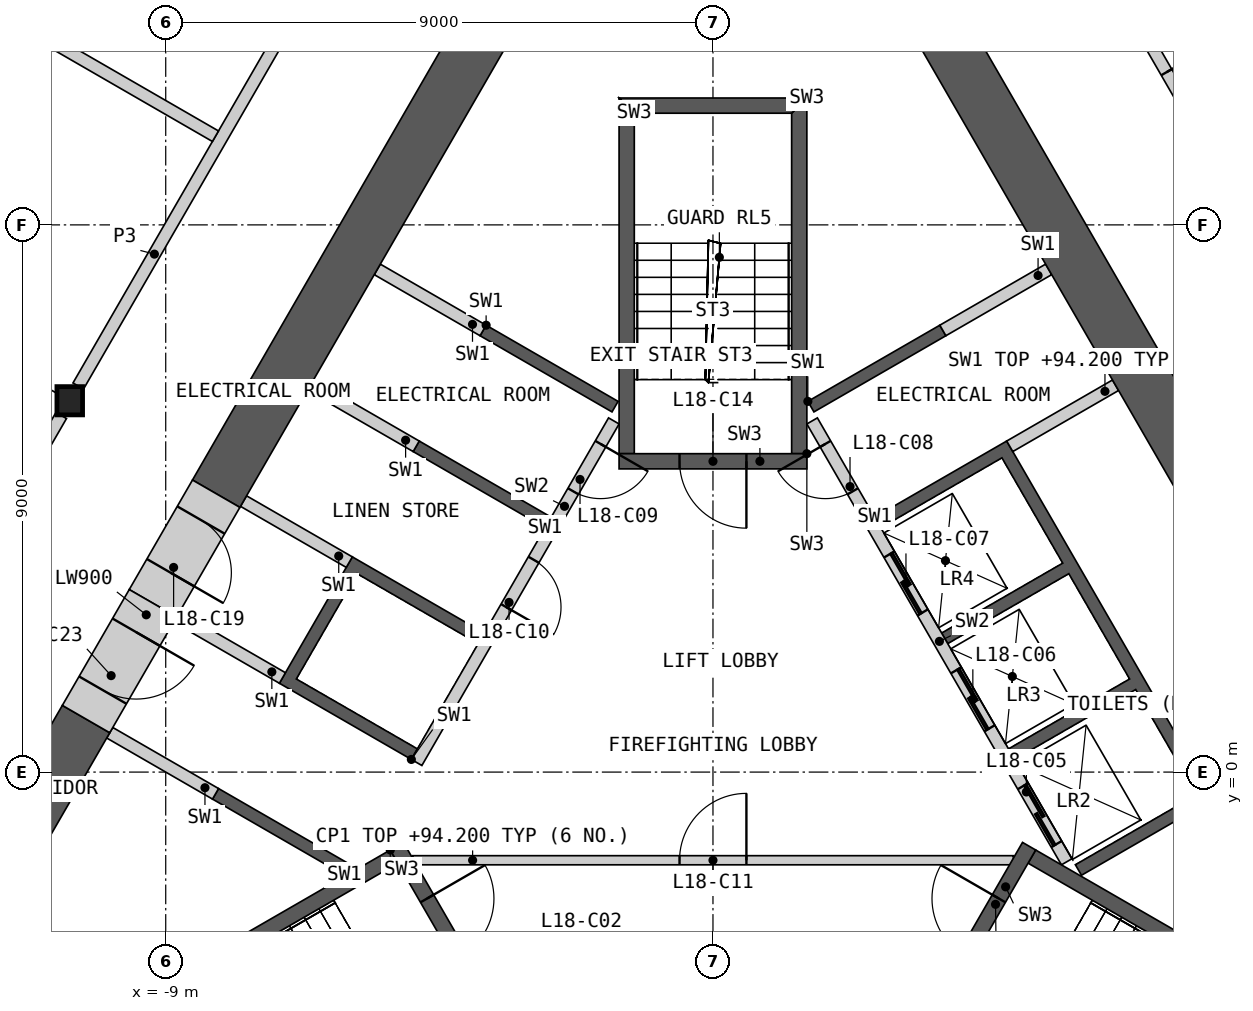
"""IFC4 building model, lengths in metres.
Left out: names, types, materials, properties, quantities, classifications, styles, units other than length and angle.
Written with IfcOpenShell. Run it as: python <this file> out.ifc"""

import sys

from ifc_helpers import new_model, si_unit, direction, frame, frame_2d, origin, origin_2d, place, context, subcontext, project, spatial, polyline, rectangle, i_section, outline, extrude, element, fill, save


model = new_model("IFC4")
c1 = context("Model", 3, precision=1e-05, world=origin(), true_north=direction((0.0, 1.0)))
c2 = subcontext(c1, "Body", "Model", "MODEL_VIEW")
j1 = project(units=[si_unit("LENGTHUNIT", "METRE"), si_unit("PLANEANGLEUNIT", "RADIAN")], contexts=[c1])
p1 = place(None, origin())
s1 = spatial("IfcSite", under=j1, at=p1, CompositionType="ELEMENT")
p2 = place(p1, origin())
s2 = spatial("IfcBuilding", under=s1, at=p2, CompositionType="ELEMENT")
p3 = place(p2, frame((0.0, 0.0, 84.6)))
s3 = spatial("IfcBuildingStorey", under=s2, at=p3, CompositionType="ELEMENT", Elevation=84.6)
p4 = place(p3, frame((-10.578, 6.107, 0.0), z_axis=(0.0, 0.0, 1.0), x_axis=(1.0, 0.0, 0.0)))
e1 = element("IfcColumn", 1, at=p4, inside=s3, PredefinedType="COLUMN", context=c2, shape_type="SweptSolid", body=[
    extrude(i_section(OverallWidth=0.421, OverallDepth=0.465, WebThickness=0.045, FlangeThickness=0.072, at=origin_2d()), origin(), (0.0, 0.0, 1.0), 10.0),
])
p5 = place(p3, origin())
e2 = element("IfcWall", 2, at=p5, inside=s3, PredefinedType="SHEAR", context=c2, shape_type="SweptSolid", body=[
    extrude(outline(polyline([(1.561, 6.097), (3.731, 7.35), (3.831, 7.177), (1.66, 5.924), (1.561, 6.097)])), origin(), (0.0, 0.0, 1.0), 9.6),
])
p6 = place(p3, origin())
e3 = element("IfcWall", 3, at=p6, inside=s3, PredefinedType="SHEAR", context=c2, shape_type="SweptSolid", body=[
    extrude(outline(polyline([(2.66, 4.192), (4.831, 5.445), (8.231, -0.444), (6.061, -1.697), (5.96, -1.524), (7.952, -0.374), (6.952, 1.358), (4.96, 0.208), (4.861, 0.381), (6.852, 1.531), (5.852, 3.263), (3.861, 2.113), (3.76, 2.287), (5.752, 3.437), (4.752, 5.169), (2.76, 4.019), (2.66, 4.192)])), origin(), (0.0, 0.0, 1.0), 9.6),
])
p7 = place(p3, frame((5.817, -1.476, 0.0), z_axis=(0.0, 0.0, 1.0), x_axis=(-0.500002616675, 0.866023893041, 0.0)))
e4 = element("IfcWall", 4, at=p7, inside=s3, PredefinedType="SOLIDWALL", context=c2, shape_type="SweptSolid", body=[
    extrude(rectangle(XDim=8.373, YDim=0.2, at=frame_2d((4.187, 0.0))), origin(), (0.0, 0.0, 1.0), 9.6),
])
p8 = place(p7, frame((0.337, 0.0, 0.0)))
e5 = element("IfcOpeningElement", 5, at=p8, cuts=e4, PredefinedType="OPENING", context=c2, shape_type="SweptSolid", body=[
    extrude(rectangle(XDim=1.1, YDim=2.1, at=frame_2d((0.55, 1.05))), frame((0.0, 0.11, 0.0), z_axis=(0.0, -1.0, 0.0), x_axis=(1.0, 0.0, 0.0)), (0.0, 0.0, 1.0), 0.22),
])
p9 = place(p7, frame((2.537, 0.0, 0.0)))
e6 = element("IfcOpeningElement", 6, at=p9, cuts=e4, PredefinedType="OPENING", context=c2, shape_type="SweptSolid", body=[
    extrude(rectangle(XDim=1.1, YDim=2.1, at=frame_2d((0.55, 1.05))), frame((0.0, 0.11, 0.0), z_axis=(0.0, -1.0, 0.0), x_axis=(1.0, 0.0, 0.0)), (0.0, 0.0, 1.0), 0.22),
])
p10 = place(p7, frame((4.737, 0.0, 0.0)))
e7 = element("IfcOpeningElement", 7, at=p10, cuts=e4, PredefinedType="OPENING", context=c2, shape_type="SweptSolid", body=[
    extrude(rectangle(XDim=1.1, YDim=2.1, at=frame_2d((0.55, 1.05))), frame((0.0, 0.11, 0.0), z_axis=(0.0, -1.0, 0.0), x_axis=(1.0, 0.0, 0.0)), (0.0, 0.0, 1.0), 0.22),
])
p11 = place(p7, frame((7.037, 0.0, 0.0)))
e8 = element("IfcOpeningElement", 8, at=p11, cuts=e4, PredefinedType="OPENING", context=c2, shape_type="SweptSolid", body=[
    extrude(rectangle(XDim=0.9, YDim=2.1, at=frame_2d((0.45, 1.05))), frame((0.0, 0.11, 0.0), z_axis=(0.0, -1.0, 0.0), x_axis=(1.0, 0.0, 0.0)), (0.0, 0.0, 1.0), 0.22),
])
p12 = place(p3, frame((4.881, 5.358, 0.0), z_axis=(0.0, 0.0, 1.0), x_axis=(0.866035824272, 0.499981950752, 0.0)))
e9 = element("IfcWall", 9, at=p12, inside=s3, PredefinedType="SHEAR", context=c2, shape_type="SweptSolid", body=[
    extrude(rectangle(XDim=2.009, YDim=0.2, at=frame_2d((1.004, 0.0))), origin(), (0.0, 0.0, 1.0), 9.6),
])
p13 = place(p3, frame((3.781, 7.263, 0.0), z_axis=(0.0, 0.0, 1.0), x_axis=(0.865983199114, 0.50007309351, 0.0)))
e10 = element("IfcWall", 10, at=p13, inside=s3, PredefinedType="SHEAR", context=c2, shape_type="SweptSolid", body=[
    extrude(rectangle(XDim=2.009, YDim=0.2, at=frame_2d((1.004, 0.0))), origin(), (0.0, 0.0, 1.0), 9.6),
])
p14 = place(p3, origin())
e11 = element("IfcWall", 11, at=p14, inside=s3, PredefinedType="SHEAR", context=c2, shape_type="SweptSolid", body=[
    extrude(outline(polyline([(-6.061, -1.697), (-8.231, -0.444), (-8.131, -0.271), (-5.96, -1.524), (-6.061, -1.697)])), origin(), (0.0, 0.0, 1.0), 9.6),
])
p15 = place(p3, origin())
e12 = element("IfcWall", 12, at=p15, inside=s3, PredefinedType="SHEAR", context=c2, shape_type="SweptSolid", body=[
    extrude(outline(polyline([(-4.96, 0.208), (-7.131, 1.461), (-5.931, 3.54), (-3.76, 2.287), (-3.861, 2.113), (-5.852, 3.263), (-6.852, 1.531), (-4.861, 0.381), (-4.96, 0.208)])), origin(), (0.0, 0.0, 1.0), 9.6),
])
p16 = place(p3, origin())
e13 = element("IfcWall", 13, at=p16, inside=s3, PredefinedType="SHEAR", context=c2, shape_type="SweptSolid", body=[
    extrude(outline(polyline([(-2.76, 4.019), (-4.931, 5.272), (-4.831, 5.445), (-2.66, 4.192), (-2.76, 4.019)])), origin(), (0.0, 0.0, 1.0), 9.6),
])
p17 = place(p3, origin())
e14 = element("IfcWall", 14, at=p17, inside=s3, PredefinedType="SHEAR", context=c2, shape_type="SweptSolid", body=[
    extrude(outline(polyline([(-3.731, 7.35), (-1.561, 6.097), (-1.66, 5.924), (-3.831, 7.177), (-3.731, 7.35)])), origin(), (0.0, 0.0, 1.0), 9.6),
])
p18 = place(p3, frame((-1.631, 5.776, 0.0), z_axis=(0.0, 0.0, 1.0), x_axis=(-0.499992876559, -0.866029516466, 0.0)))
e15 = element("IfcWall", 15, at=p18, inside=s3, PredefinedType="SOLIDWALL", context=c2, shape_type="SweptSolid", body=[
    extrude(rectangle(XDim=6.486, YDim=0.2, at=frame_2d((3.243, 0.0))), origin(), (0.0, 0.0, 1.0), 9.6),
])
p19 = place(p18, frame((0.437, 0.0, 0.0)))
e16 = element("IfcOpeningElement", 16, at=p19, cuts=e15, PredefinedType="OPENING", context=c2, shape_type="SweptSolid", body=[
    extrude(rectangle(XDim=0.9, YDim=2.1, at=frame_2d((0.45, 1.05))), frame((0.0, 0.11, 0.0), z_axis=(0.0, -1.0, 0.0), x_axis=(1.0, 0.0, 0.0)), (0.0, 0.0, 1.0), 0.22),
])
p20 = place(p18, frame((2.637, 0.0, 0.0)))
e17 = element("IfcOpeningElement", 17, at=p20, cuts=e15, PredefinedType="OPENING", context=c2, shape_type="SweptSolid", body=[
    extrude(rectangle(XDim=0.9, YDim=2.1, at=frame_2d((0.45, 1.05))), frame((0.0, 0.11, 0.0), z_axis=(0.0, -1.0, 0.0), x_axis=(1.0, 0.0, 0.0)), (0.0, 0.0, 1.0), 0.22),
])
p21 = place(p3, frame((-3.781, 7.263, 0.0), z_axis=(0.0, 0.0, 1.0), x_axis=(-0.865983199114, 0.50007309351, 0.0)))
e18 = element("IfcWall", 18, at=p21, inside=s3, PredefinedType="SHEAR", context=c2, shape_type="SweptSolid", body=[
    extrude(rectangle(XDim=2.009, YDim=0.2, at=frame_2d((1.004, 0.0))), origin(), (0.0, 0.0, 1.0), 9.6),
])
p22 = place(p3, frame((-4.881, 5.358, 0.0), z_axis=(0.0, 0.0, 1.0), x_axis=(-0.866035824272, 0.499981950752, 0.0)))
e19 = element("IfcWall", 19, at=p22, inside=s3, PredefinedType="SHEAR", context=c2, shape_type="SweptSolid", body=[
    extrude(rectangle(XDim=2.009, YDim=0.2, at=frame_2d((1.004, 0.0))), origin(), (0.0, 0.0, 1.0), 9.6),
])
p23 = place(p3, frame((-5.981, 3.453, 0.0), z_axis=(0.0, 0.0, 1.0), x_axis=(-0.866013584312, 0.500020471368, 0.0)))
e20 = element("IfcWall", 20, at=p23, inside=s3, PredefinedType="SHEAR", context=c2, shape_type="SweptSolid", body=[
    extrude(rectangle(XDim=2.009, YDim=0.2, at=frame_2d((1.005, 0.0))), origin(), (0.0, 0.0, 1.0), 9.6),
])
p24 = place(p3, frame((-7.081, 1.548, 0.0), z_axis=(0.0, 0.0, 1.0), x_axis=(-0.865983199114, 0.50007309351, 0.0)))
e21 = element("IfcWall", 21, at=p24, inside=s3, PredefinedType="SHEAR", context=c2, shape_type="SweptSolid", body=[
    extrude(rectangle(XDim=2.009, YDim=0.2, at=frame_2d((1.004, 0.0))), origin(), (0.0, 0.0, 1.0), 9.6),
])
p25 = place(p3, frame((-8.181, -0.357, 0.0), z_axis=(0.0, 0.0, 1.0), x_axis=(-0.866035824272, 0.499981950752, 0.0)))
e22 = element("IfcWall", 22, at=p25, inside=s3, PredefinedType="SHEAR", context=c2, shape_type="SweptSolid", body=[
    extrude(rectangle(XDim=2.009, YDim=0.2, at=frame_2d((1.004, 0.0))), origin(), (0.0, 0.0, 1.0), 9.6),
])
p26 = place(p3, frame((-4.941, -1.45, 0.0), z_axis=(0.0, 0.0, 1.0), x_axis=(1.0, 0.0, 0.0)))
e23 = element("IfcWall", 23, at=p26, inside=s3, PredefinedType="PARTITIONING", context=c2, shape_type="SweptSolid", body=[
    extrude(rectangle(XDim=9.882, YDim=0.15, at=frame_2d((4.941, 0.0))), origin(), (0.0, 0.0, 1.0), 9.6),
])
p27 = place(p26, frame((4.391, 0.0, 0.0)))
e24 = element("IfcOpeningElement", 24, at=p27, cuts=e23, PredefinedType="OPENING", context=c2, shape_type="SweptSolid", body=[
    extrude(rectangle(XDim=1.1, YDim=2.1, at=frame_2d((0.55, 1.05))), frame((0.0, 0.085, 0.0), z_axis=(0.0, -1.0, 0.0), x_axis=(1.0, 0.0, 0.0)), (0.0, 0.0, 1.0), 0.17),
])
p28 = place(p3, origin())
e25 = element("IfcWall", 25, at=p28, inside=s3, PredefinedType="SHEAR", context=c2, shape_type="SweptSolid", body=[
    extrude(outline(polyline([(-5.307, -1.281), (-10.374, -4.206), (-10.032, -4.298), (-5.182, -1.498), (-5.307, -1.281)])), origin(), (0.0, 0.0, 1.0), 9.6),
])
p29 = place(p3, frame((-5.199, -1.219, 0.0), z_axis=(0.0, 0.0, 1.0), x_axis=(0.499982516597, -0.866035497597, 0.0)))
e26 = element("IfcWall", 26, at=p29, inside=s3, PredefinedType="SHEAR", context=c2, shape_type="SweptSolid", body=[
    extrude(rectangle(XDim=3.088, YDim=0.25, at=frame_2d((1.544, 0.0))), origin(), (0.0, 0.0, 1.0), 9.6),
])
p30 = place(p29, frame((0.994, 0.0, 0.0)))
e27 = element("IfcOpeningElement", 27, at=p30, cuts=e26, PredefinedType="OPENING", context=c2, shape_type="SweptSolid", body=[
    extrude(rectangle(XDim=1.1, YDim=2.1, at=frame_2d((0.55, 1.05))), frame((0.0, 0.135, 0.0), z_axis=(0.0, -1.0, 0.0), x_axis=(1.0, 0.0, 0.0)), (0.0, 0.0, 1.0), 0.27),
])
p31 = place(p3, origin())
e28 = element("IfcWall", 28, at=p31, inside=s3, PredefinedType="SHEAR", context=c2, shape_type="SweptSolid", body=[
    extrude(outline(polyline([(10.032, -4.298), (10.374, -4.206), (5.307, -1.281), (5.182, -1.498), (10.032, -4.298)])), origin(), (0.0, 0.0, 1.0), 9.6),
])
p32 = place(p3, frame((3.655, -3.893, 0.0), z_axis=(0.0, 0.0, 1.0), x_axis=(0.499982516597, 0.866035497597, 0.0)))
e29 = element("IfcWall", 29, at=p32, inside=s3, PredefinedType="SHEAR", context=c2, shape_type="SweptSolid", body=[
    extrude(rectangle(XDim=3.088, YDim=0.25, at=frame_2d((1.544, 0.0))), origin(), (0.0, 0.0, 1.0), 9.6),
])
p33 = place(p32, frame((0.994, 0.0, 0.0)))
e30 = element("IfcOpeningElement", 30, at=p33, cuts=e29, PredefinedType="OPENING", context=c2, shape_type="SweptSolid", body=[
    extrude(rectangle(XDim=1.1, YDim=2.1, at=frame_2d((0.55, 1.05))), frame((0.0, 0.135, 0.0), z_axis=(0.0, -1.0, 0.0), x_axis=(1.0, 0.0, 0.0)), (0.0, 0.0, 1.0), 0.27),
])
p34 = place(p3, origin())
e31 = element("IfcWall", 31, at=p34, inside=s3, PredefinedType="SHEAR", context=c2, shape_type="SweptSolid", body=[
    extrude(outline(polyline([(1.544, 5.237), (1.544, 11.087), (1.294, 10.837), (1.294, 5.237), (1.544, 5.237)])), origin(), (0.0, 0.0, 1.0), 9.6),
])
p35 = place(p3, origin())
e32 = element("IfcWall", 32, at=p35, inside=s3, PredefinedType="SHEAR", context=c2, shape_type="SweptSolid", body=[
    extrude(outline(polyline([(1.544, 11.087), (-1.544, 11.087), (-1.294, 10.837), (1.294, 10.837), (1.544, 11.087)])), origin(), (0.0, 0.0, 1.0), 9.6),
])
p36 = place(p3, origin())
e33 = element("IfcWall", 33, at=p36, inside=s3, PredefinedType="SHEAR", context=c2, shape_type="SweptSolid", body=[
    extrude(outline(polyline([(-1.294, 10.837), (-1.544, 11.087), (-1.544, 5.237), (-1.294, 5.237), (-1.294, 10.837)])), origin(), (0.0, 0.0, 1.0), 9.6),
])
p37 = place(p3, frame((1.544, 5.112, 0.0), z_axis=(0.0, 0.0, 1.0), x_axis=(-1.0, 0.0, 0.0)))
e34 = element("IfcWall", 34, at=p37, inside=s3, PredefinedType="SHEAR", context=c2, shape_type="SweptSolid", body=[
    extrude(rectangle(XDim=3.088, YDim=0.25, at=frame_2d((1.544, 0.0))), origin(), (0.0, 0.0, 1.0), 9.6),
])
p38 = place(p37, frame((0.994, 0.0, 0.0)))
e35 = element("IfcOpeningElement", 35, at=p38, cuts=e34, PredefinedType="OPENING", context=c2, shape_type="SweptSolid", body=[
    extrude(rectangle(XDim=1.1, YDim=2.1, at=frame_2d((0.55, 1.05))), frame((0.0, 0.135, 0.0), z_axis=(0.0, -1.0, 0.0), x_axis=(1.0, 0.0, 0.0)), (0.0, 0.0, 1.0), 0.27),
])
p39 = place(p3, frame((8.16, 4.596, 0.0), z_axis=(0.0, 0.0, 1.0), x_axis=(-0.500009830349, 0.866019728156, 0.0)))
e36 = element("IfcWall", 36, at=p39, inside=s3, PredefinedType="SHEAR", context=c2, shape_type="SweptSolid", body=[
    extrude(rectangle(XDim=15.541, YDim=0.9, at=frame_2d((7.771, 0.0))), origin(), (0.0, 0.0, 1.0), 9.6),
])
p40 = place(p3, frame((-3.675, 12.365, 0.0), z_axis=(0.0, 0.0, 1.0), x_axis=(-0.500014716158, -0.86601690724, 0.0)))
e37 = element("IfcWall", 37, at=p40, inside=s3, PredefinedType="SHEAR", context=c2, shape_type="SweptSolid", body=[
    extrude(rectangle(XDim=8.99, YDim=0.9, at=frame_2d((4.495, 0.0))), origin(), (0.0, 0.0, 1.0), 9.6),
])
p41 = place(p3, frame((-10.31, 0.872, 0.0), z_axis=(0.0, 0.0, 1.0), x_axis=(-0.499991893987, -0.866030083742, 0.0)))
e38 = element("IfcWall", 38, at=p41, inside=s3, PredefinedType="SHEAR", context=c2, shape_type="SweptSolid", body=[
    extrude(rectangle(XDim=4.471, YDim=0.9, at=frame_2d((2.235, 0.0))), origin(), (0.0, 0.0, 1.0), 9.6),
])
p42 = place(p3, frame((-8.17, 4.579, 0.0), z_axis=(0.0, 0.0, 1.0), x_axis=(-0.499888406853, -0.866089822532, 0.0)))
e39 = element("IfcWall", 39, at=p42, inside=s3, PredefinedType="SHEAR", context=c2, shape_type="SweptSolid", body=[
    extrude(rectangle(XDim=2.08, YDim=0.9, at=frame_2d((1.04, 0.0))), origin(), (0.0, 0.0, 1.0), 9.6),
])
p43 = place(p42, frame((0.5, 0.0, 0.0)))
e40 = element("IfcOpeningElement", 40, at=p43, cuts=e39, PredefinedType="OPENING", context=c2, shape_type="SweptSolid", body=[
    extrude(rectangle(XDim=1.0, YDim=2.1, at=frame_2d((0.5, 1.05))), frame((0.0, 0.46, 0.0), z_axis=(0.0, -1.0, 0.0), x_axis=(1.0, 0.0, 0.0)), (0.0, 0.0, 1.0), 0.92),
])
p44 = place(p3, frame((-9.21, 2.777, 0.0), z_axis=(0.0, 0.0, 1.0), x_axis=(-0.500077893725, -0.86598042715, 0.0)))
e41 = element("IfcWall", 41, at=p44, inside=s3, PredefinedType="SHEAR", context=c2, shape_type="SweptSolid", body=[
    extrude(rectangle(XDim=2.2, YDim=0.9, at=frame_2d((1.1, 0.0))), origin(), (0.0, 0.0, 1.0), 9.6),
])
p45 = place(p44, frame((0.55, 0.0, 0.0)))
e42 = element("IfcOpeningElement", 42, at=p45, cuts=e41, PredefinedType="OPENING", context=c2, shape_type="SweptSolid", body=[
    extrude(rectangle(XDim=1.1, YDim=2.1, at=frame_2d((0.55, 1.05))), frame((0.0, 0.46, 0.0), z_axis=(0.0, -1.0, 0.0), x_axis=(1.0, 0.0, 0.0)), (0.0, 0.0, 1.0), 0.92),
])
p46 = place(p3, frame((5.429, 15.026, 0.0), z_axis=(0.0, 0.0, 1.0), x_axis=(0.50001002959, -0.86601961312, 0.0)))
e43 = element("IfcWall", 43, at=p46, inside=s3, PredefinedType="PARTITIONING", context=c2, shape_type="SweptSolid", body=[
    extrude(rectangle(XDim=10.019, YDim=0.2, at=frame_2d((5.009, 0.0))), origin(), (0.0, 0.0, 1.0), 9.6),
])
p47 = place(p46, frame((4.059, 0.0, 0.0)))
e44 = element("IfcOpeningElement", 44, at=p47, cuts=e43, PredefinedType="OPENING", context=c2, shape_type="SweptSolid", body=[
    extrude(rectangle(XDim=1.8, YDim=2.1, at=frame_2d((0.9, 1.05))), frame((0.0, 0.11, 0.0), z_axis=(0.0, -1.0, 0.0), x_axis=(1.0, 0.0, 0.0)), (0.0, 0.0, 1.0), 0.22),
])
p48 = place(p3, frame((-10.439, 6.35, 0.0), z_axis=(0.0, 0.0, 1.0), x_axis=(0.50001002959, 0.86601961312, 0.0)))
e45 = element("IfcWall", 45, at=p48, inside=s3, PredefinedType="PARTITIONING", context=c2, shape_type="SweptSolid", body=[
    extrude(rectangle(XDim=10.019, YDim=0.2, at=frame_2d((5.009, 0.0))), origin(), (0.0, 0.0, 1.0), 9.6),
])
p49 = place(p3, frame((-15.728, -2.811, 0.0), z_axis=(0.0, 0.0, 1.0), x_axis=(0.49999175339, 0.866030164915, 0.0)))
e46 = element("IfcWall", 46, at=p49, inside=s3, PredefinedType="PARTITIONING", context=c2, shape_type="SweptSolid", body=[
    extrude(rectangle(XDim=10.019, YDim=0.2, at=frame_2d((5.009, 0.0))), origin(), (0.0, 0.0, 1.0), 9.6),
])
p50 = place(p49, frame((4.459, 0.0, 0.0)))
e47 = element("IfcOpeningElement", 47, at=p50, cuts=e46, PredefinedType="OPENING", context=c2, shape_type="SweptSolid", body=[
    extrude(rectangle(XDim=1.0, YDim=2.1, at=frame_2d((0.5, 1.05))), frame((0.0, 0.11, 0.0), z_axis=(0.0, -1.0, 0.0), x_axis=(1.0, 0.0, 0.0)), (0.0, 0.0, 1.0), 0.22),
])
p51 = place(p3, frame((-15.592, 14.736, 0.0), z_axis=(0.0, 0.0, 1.0), x_axis=(0.866039711517, -0.499975217462, 0.0)))
e48 = element("IfcWall", 48, at=p51, inside=s3, PredefinedType="PARTITIONING", context=c2, shape_type="SweptSolid", body=[
    extrude(rectangle(XDim=8.556, YDim=0.2, at=frame_2d((4.278, 0.0))), origin(), (0.0, 0.0, 1.0), 8.685),
])
p52 = place(p8, origin())
e49 = element("IfcDoor", 49, at=p52, inside=s3, OperationType="SLIDING_TO_LEFT", PredefinedType="DOOR", context=c2, shape_type="SweptSolid", body=[
    extrude(rectangle(XDim=1.1, YDim=2.1, at=frame_2d((0.55, 1.05))), frame((0.0, 0.025, 0.0), z_axis=(0.0, -1.0, 0.0), x_axis=(1.0, 0.0, 0.0)), (0.0, 0.0, 1.0), 0.05),
])
fill(e5, e49)
p53 = place(p9, origin())
e50 = element("IfcDoor", 50, at=p53, inside=s3, OperationType="SLIDING_TO_LEFT", PredefinedType="DOOR", context=c2, shape_type="SweptSolid", body=[
    extrude(rectangle(XDim=1.1, YDim=2.1, at=frame_2d((0.55, 1.05))), frame((0.0, 0.025, 0.0), z_axis=(0.0, -1.0, 0.0), x_axis=(1.0, 0.0, 0.0)), (0.0, 0.0, 1.0), 0.05),
])
fill(e6, e50)
p54 = place(p10, origin())
e51 = element("IfcDoor", 51, at=p54, inside=s3, OperationType="SLIDING_TO_LEFT", PredefinedType="DOOR", context=c2, shape_type="SweptSolid", body=[
    extrude(rectangle(XDim=1.1, YDim=2.1, at=frame_2d((0.55, 1.05))), frame((0.0, 0.025, 0.0), z_axis=(0.0, -1.0, 0.0), x_axis=(1.0, 0.0, 0.0)), (0.0, 0.0, 1.0), 0.05),
])
fill(e7, e51)
p55 = place(p11, origin())
e52 = element("IfcDoor", 52, at=p55, inside=s3, OperationType="SINGLE_SWING_RIGHT", PredefinedType="DOOR", context=c2, shape_type="SweptSolid", body=[
    extrude(rectangle(XDim=0.9, YDim=2.1, at=frame_2d((0.45, 1.05))), frame((0.0, 0.025, 0.0), z_axis=(0.0, -1.0, 0.0), x_axis=(1.0, 0.0, 0.0)), (0.0, 0.0, 1.0), 0.05),
])
fill(e8, e52)
p56 = place(p19, origin())
e53 = element("IfcDoor", 53, at=p56, inside=s3, OperationType="SINGLE_SWING_LEFT", PredefinedType="DOOR", context=c2, shape_type="SweptSolid", body=[
    extrude(rectangle(XDim=0.9, YDim=2.1, at=frame_2d((0.45, 1.05))), frame((0.0, 0.025, 0.0), z_axis=(0.0, -1.0, 0.0), x_axis=(1.0, 0.0, 0.0)), (0.0, 0.0, 1.0), 0.05),
])
fill(e16, e53)
p57 = place(p20, origin())
e54 = element("IfcDoor", 54, at=p57, inside=s3, OperationType="SINGLE_SWING_RIGHT", PredefinedType="DOOR", context=c2, shape_type="SweptSolid", body=[
    extrude(rectangle(XDim=0.9, YDim=2.1, at=frame_2d((0.45, 1.05))), frame((0.0, 0.025, 0.0), z_axis=(0.0, -1.0, 0.0), x_axis=(1.0, 0.0, 0.0)), (0.0, 0.0, 1.0), 0.05),
])
fill(e17, e54)
p58 = place(p27, origin())
e55 = element("IfcDoor", 55, at=p58, inside=s3, OperationType="SINGLE_SWING_RIGHT", PredefinedType="DOOR", context=c2, shape_type="SweptSolid", body=[
    extrude(rectangle(XDim=1.1, YDim=2.1, at=frame_2d((0.55, 1.05))), frame((0.0, 0.025, 0.0), z_axis=(0.0, -1.0, 0.0), x_axis=(1.0, 0.0, 0.0)), (0.0, 0.0, 1.0), 0.05),
])
fill(e24, e55)
p59 = place(p30, origin())
e56 = element("IfcDoor", 56, at=p59, inside=s3, OperationType="SINGLE_SWING_LEFT", PredefinedType="DOOR", context=c2, shape_type="SweptSolid", body=[
    extrude(rectangle(XDim=1.1, YDim=2.1, at=frame_2d((0.55, 1.05))), frame((0.0, 0.025, 0.0), z_axis=(0.0, -1.0, 0.0), x_axis=(1.0, 0.0, 0.0)), (0.0, 0.0, 1.0), 0.05),
])
fill(e27, e56)
p60 = place(p33, origin())
e57 = element("IfcDoor", 57, at=p60, inside=s3, OperationType="SINGLE_SWING_RIGHT", PredefinedType="DOOR", context=c2, shape_type="SweptSolid", body=[
    extrude(rectangle(XDim=1.1, YDim=2.1, at=frame_2d((0.55, 1.05))), frame((0.0, 0.025, 0.0), z_axis=(0.0, -1.0, 0.0), x_axis=(1.0, 0.0, 0.0)), (0.0, 0.0, 1.0), 0.05),
])
fill(e30, e57)
p61 = place(p38, origin())
e58 = element("IfcDoor", 58, at=p61, inside=s3, OperationType="SINGLE_SWING_LEFT", PredefinedType="DOOR", context=c2, shape_type="SweptSolid", body=[
    extrude(rectangle(XDim=1.1, YDim=2.1, at=frame_2d((0.55, 1.05))), frame((0.0, 0.025, 0.0), z_axis=(0.0, -1.0, 0.0), x_axis=(1.0, 0.0, 0.0)), (0.0, 0.0, 1.0), 0.05),
])
fill(e35, e58)
p62 = place(p43, origin())
e59 = element("IfcDoor", 59, at=p62, inside=s3, OperationType="SINGLE_SWING_RIGHT", PredefinedType="DOOR", context=c2, shape_type="SweptSolid", body=[
    extrude(rectangle(XDim=1.0, YDim=2.1, at=frame_2d((0.5, 1.05))), frame((0.0, 0.205, 0.0), z_axis=(0.0, -1.0, 0.0), x_axis=(1.0, 0.0, 0.0)), (0.0, 0.0, 1.0), 0.05),
])
fill(e40, e59)
p63 = place(p45, origin())
e60 = element("IfcDoor", 60, at=p63, inside=s3, OperationType="SINGLE_SWING_LEFT", PredefinedType="DOOR", context=c2, shape_type="SweptSolid", body=[
    extrude(rectangle(XDim=1.1, YDim=2.1, at=frame_2d((0.55, 1.05))), frame((0.0, 0.205, 0.0), z_axis=(0.0, -1.0, 0.0), x_axis=(1.0, 0.0, 0.0)), (0.0, 0.0, 1.0), 0.05),
])
fill(e42, e60)
p64 = place(p47, origin())
e61 = element("IfcDoor", 61, at=p64, inside=s3, OperationType="DOUBLE_DOOR_SINGLE_SWING", PredefinedType="DOOR", context=c2, shape_type="SweptSolid", body=[
    extrude(rectangle(XDim=1.8, YDim=2.1, at=frame_2d((0.9, 1.05))), frame((0.0, 0.025, 0.0), z_axis=(0.0, -1.0, 0.0), x_axis=(1.0, 0.0, 0.0)), (0.0, 0.0, 1.0), 0.05),
])
fill(e44, e61)
save(model, sys.argv[1])
